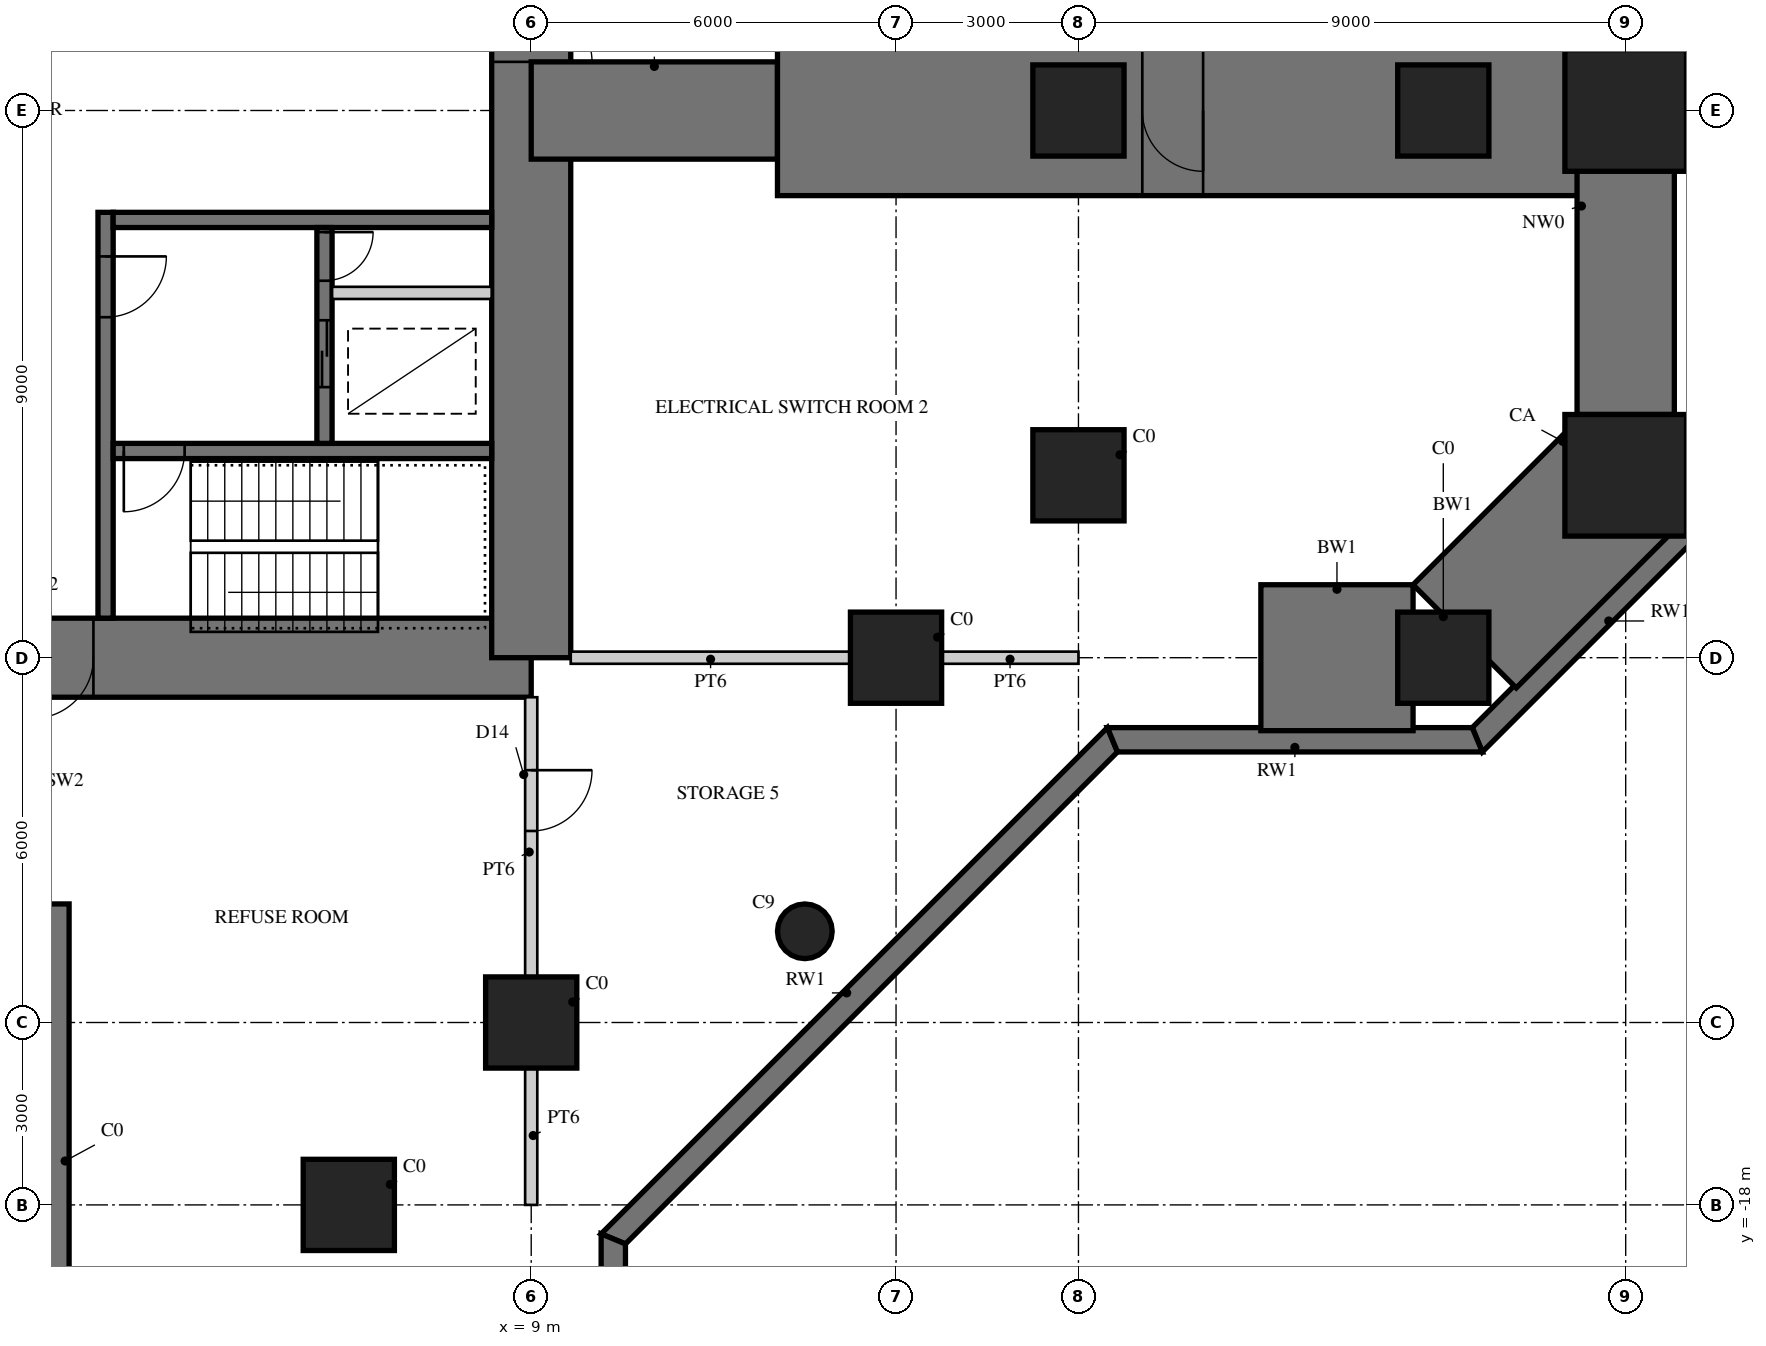
"""IFC4 building model, lengths in metres.
Left out: names, types, materials, properties, quantities, classifications, styles, units other than length and angle.
Written with IfcOpenShell. Run it as: python <this file> out.ifc"""

import sys

from ifc_helpers import new_model, si_unit, direction, frame, frame_2d, origin, origin_2d, place, context, subcontext, project, spatial, polyline, rectangle, circle, outline, extrude, element, fill, save


model = new_model("IFC4")
c1 = context("Model", 3, precision=1e-05, world=origin(), true_north=direction((0.0, 1.0)))
c2 = subcontext(c1, "Body", "Model", "MODEL_VIEW")
j1 = project(units=[si_unit("LENGTHUNIT", "METRE"), si_unit("PLANEANGLEUNIT", "RADIAN")], contexts=[c1])
p1 = place(None, origin())
s1 = spatial("IfcSite", under=j1, at=p1, CompositionType="ELEMENT")
p2 = place(p1, origin())
s2 = spatial("IfcBuilding", under=s1, at=p2, CompositionType="ELEMENT")
p3 = place(p2, frame((0.0, 0.0, -4.0)))
s3 = spatial("IfcBuildingStorey", under=s2, at=p3, CompositionType="ELEMENT", Elevation=-4.0)
p4 = place(p3, origin())
e1 = element("IfcWall", 1, at=p4, inside=s3, PredefinedType="SOLIDWALL", context=c2, shape_type="SweptSolid", body=[
    extrude(outline(polyline([(18.476, -10.15), (18.642, -10.55), (10.55, -18.642), (10.15, -18.476), (18.476, -10.15)])), origin(), (0.0, 0.0, 1.0), 4.0),
])
p5 = place(p3, origin())
e2 = element("IfcWall", 2, at=p5, inside=s3, PredefinedType="SOLIDWALL", context=c2, shape_type="SweptSolid", body=[
    extrude(outline(polyline([(10.15, -18.476), (10.55, -18.642), (10.55, -24.642), (10.15, -24.476), (10.15, -18.476)])), origin(), (0.0, 0.0, 1.0), 4.0),
])
p6 = place(p3, origin())
e3 = element("IfcWall", 3, at=p6, inside=s3, PredefinedType="SOLIDWALL", context=c2, shape_type="SweptSolid", body=[
    extrude(outline(polyline([(28.15, -6.476), (28.55, -6.642), (24.642, -10.55), (24.476, -10.15), (28.15, -6.476)])), origin(), (0.0, 0.0, 1.0), 4.0),
])
p7 = place(p3, origin())
e4 = element("IfcWall", 4, at=p7, inside=s3, PredefinedType="SOLIDWALL", context=c2, shape_type="SweptSolid", body=[
    extrude(outline(polyline([(24.476, -10.15), (24.642, -10.55), (18.642, -10.55), (18.476, -10.15), (24.476, -10.15)])), origin(), (0.0, 0.0, 1.0), 4.0),
])
p8 = place(p3, frame((-9.0, -9.0, 0.0), z_axis=(0.0, 0.0, 1.0), x_axis=(1.0, 0.0, 0.0)))
e5 = element("IfcWall", 5, at=p8, inside=s3, PredefinedType="SHEAR", context=c2, shape_type="SweptSolid", body=[
    extrude(rectangle(XDim=18.0, YDim=1.3, at=frame_2d((9.0, 0.0))), origin(), (0.0, 0.0, 1.0), 4.0),
])
p9 = place(p8, frame((9.8, 0.0, 0.0)))
e6 = element("IfcOpeningElement", 6, at=p9, cuts=e5, PredefinedType="OPENING", context=c2, shape_type="SweptSolid", body=[
    extrude(rectangle(XDim=1.0, YDim=2.4, at=frame_2d((0.5, 1.2))), frame((0.0, 0.66, 0.0), z_axis=(0.0, -1.0, 0.0), x_axis=(1.0, 0.0, 0.0)), (0.0, 0.0, 1.0), 1.32),
])
p10 = place(p3, frame((9.0, -9.0, 0.0), z_axis=(0.0, 0.0, 1.0), x_axis=(0.0, 1.0, 0.0)))
e7 = element("IfcWall", 7, at=p10, inside=s3, PredefinedType="SHEAR", context=c2, shape_type="SweptSolid", body=[
    extrude(rectangle(XDim=18.0, YDim=1.3, at=frame_2d((9.0, 0.0))), origin(), (0.0, 0.0, 1.0), 4.0),
])
p11 = place(p10, frame((9.8, 0.0, 0.0)))
e8 = element("IfcOpeningElement", 8, at=p11, cuts=e7, PredefinedType="OPENING", context=c2, shape_type="SweptSolid", body=[
    extrude(rectangle(XDim=1.0, YDim=2.4, at=frame_2d((0.5, 1.2))), frame((0.0, 0.66, 0.0), z_axis=(0.0, -1.0, 0.0), x_axis=(1.0, 0.0, 0.0)), (0.0, 0.0, 1.0), 1.32),
])
p12 = place(p3, frame((2.0, -1.675, 0.0), z_axis=(0.0, 0.0, 1.0), x_axis=(0.0, -1.0, 0.0)))
e9 = element("IfcWall", 9, at=p12, inside=s3, PredefinedType="SHEAR", context=c2, shape_type="SweptSolid", body=[
    extrude(rectangle(XDim=6.675, YDim=0.25, at=frame_2d((3.337, 0.0))), origin(), (0.0, 0.0, 1.0), 4.0),
])
p13 = place(p12, frame((0.725, 0.0, 0.0)))
e10 = element("IfcOpeningElement", 10, at=p13, cuts=e9, PredefinedType="OPENING", context=c2, shape_type="SweptSolid", body=[
    extrude(rectangle(XDim=1.0, YDim=2.1, at=frame_2d((0.5, 1.05))), frame((0.0, 0.135, 0.0), z_axis=(0.0, -1.0, 0.0), x_axis=(1.0, 0.0, 0.0)), (0.0, 0.0, 1.0), 0.27),
])
p14 = place(p3, frame((2.125, -1.8, 0.0), z_axis=(0.0, 0.0, 1.0), x_axis=(1.0, 0.0, 0.0)))
e11 = element("IfcWall", 11, at=p14, inside=s3, PredefinedType="SHEAR", context=c2, shape_type="SweptSolid", body=[
    extrude(rectangle(XDim=6.225, YDim=0.25, at=frame_2d((3.113, 0.0))), origin(), (0.0, 0.0, 1.0), 4.0),
])
p15 = place(p3, frame((2.125, -5.6, 0.0), z_axis=(0.0, 0.0, 1.0), x_axis=(1.0, 0.0, 0.0)))
e12 = element("IfcWall", 12, at=p15, inside=s3, PredefinedType="SHEAR", context=c2, shape_type="SweptSolid", body=[
    extrude(rectangle(XDim=6.225, YDim=0.25, at=frame_2d((3.113, 0.0))), origin(), (0.0, 0.0, 1.0), 4.0),
])
p16 = place(p15, frame((0.175, 0.0, 0.0)))
e13 = element("IfcOpeningElement", 13, at=p16, cuts=e12, PredefinedType="OPENING", context=c2, shape_type="SweptSolid", body=[
    extrude(rectangle(XDim=1.0, YDim=2.1, at=frame_2d((0.5, 1.05))), frame((0.0, 0.135, 0.0), z_axis=(0.0, -1.0, 0.0), x_axis=(1.0, 0.0, 0.0)), (0.0, 0.0, 1.0), 0.27),
])
p17 = place(p3, frame((5.6, -1.925, 0.0), z_axis=(0.0, 0.0, 1.0), x_axis=(0.0, -1.0, 0.0)))
e14 = element("IfcWall", 14, at=p17, inside=s3, PredefinedType="SHEAR", context=c2, shape_type="SweptSolid", body=[
    extrude(rectangle(XDim=3.55, YDim=0.25, at=frame_2d((1.775, 0.0))), origin(), (0.0, 0.0, 1.0), 4.0),
])
p18 = place(p17, frame((1.525, 0.0, 0.0)))
e15 = element("IfcOpeningElement", 15, at=p18, cuts=e14, PredefinedType="OPENING", context=c2, shape_type="SweptSolid", body=[
    extrude(rectangle(XDim=1.1, YDim=2.2, at=frame_2d((0.55, 1.1))), frame((0.0, 0.135, 0.0), z_axis=(0.0, -1.0, 0.0), x_axis=(1.0, 0.0, 0.0)), (0.0, 0.0, 1.0), 0.27),
])
p19 = place(p17, frame((0.075, 0.0, 0.0)))
e16 = element("IfcOpeningElement", 16, at=p19, cuts=e14, PredefinedType="OPENING", context=c2, shape_type="SweptSolid", body=[
    extrude(rectangle(XDim=0.8, YDim=2.1, at=frame_2d((0.4, 1.05))), frame((0.0, 0.135, 0.0), z_axis=(0.0, -1.0, 0.0), x_axis=(1.0, 0.0, 0.0)), (0.0, 0.0, 1.0), 0.27),
])
p20 = place(p3, frame((5.725, -3.0, 0.0), z_axis=(0.0, 0.0, 1.0), x_axis=(1.0, 0.0, 0.0)))
e17 = element("IfcWall", 17, at=p20, inside=s3, PredefinedType="PARTITIONING", context=c2, shape_type="SweptSolid", body=[
    extrude(rectangle(XDim=2.625, YDim=0.2, at=frame_2d((1.312, 0.0))), origin(), (0.0, 0.0, 1.0), 4.0),
])
p21 = place(p3, frame((9.0, 0.0, 0.0), z_axis=(0.0, 0.0, 1.0), x_axis=(1.0, 0.0, 0.0)))
e18 = element("IfcWall", 18, at=p21, inside=s3, PredefinedType="SHEAR", context=c2, shape_type="SweptSolid", body=[
    extrude(rectangle(XDim=4.05, YDim=1.6, at=frame_2d((2.025, 0.0))), origin(), (0.0, 0.0, 1.0), 4.0),
])
p22 = place(p3, frame((13.05, 0.0, 0.0), z_axis=(0.0, 0.0, 1.0), x_axis=(1.0, 0.0, 0.0)))
e19 = element("IfcWall", 19, at=p22, inside=s3, PredefinedType="SHEAR", context=c2, shape_type="SweptSolid", body=[
    extrude(rectangle(XDim=13.95, YDim=2.8, at=frame_2d((6.975, 0.0))), origin(), (0.0, 0.0, 1.0), 4.0),
])
p23 = place(p22, frame((6.0, 0.0, 0.0)))
e20 = element("IfcOpeningElement", 20, at=p23, cuts=e19, PredefinedType="OPENING", context=c2, shape_type="SweptSolid", body=[
    extrude(rectangle(XDim=1.0, YDim=2.2, at=frame_2d((0.5, 1.1))), frame((0.0, 1.41, 0.0), z_axis=(0.0, -1.0, 0.0), x_axis=(1.0, 0.0, 0.0)), (0.0, 0.0, 1.0), 2.82),
])
p24 = place(p3, frame((21.0, -9.0, 0.0), z_axis=(0.0, 0.0, 1.0), x_axis=(1.0, 0.0, 0.0)))
e21 = element("IfcWall", 21, at=p24, inside=s3, PredefinedType="SHEAR", context=c2, shape_type="SweptSolid", body=[
    extrude(rectangle(XDim=2.503, YDim=2.4, at=frame_2d((1.251, 0.0))), origin(), (0.0, 0.0, 1.0), 4.0),
])
p25 = place(p3, frame((24.352, -8.648, 0.0), z_axis=(0.0, 0.0, 1.0), x_axis=(0.707106781187, 0.707106781187, 0.0)))
e22 = element("IfcWall", 22, at=p25, inside=s3, PredefinedType="SHEAR", context=c2, shape_type="SweptSolid", body=[
    extrude(rectangle(XDim=3.745, YDim=2.4, at=frame_2d((1.873, 0.0))), origin(), (0.0, 0.0, 1.0), 4.0),
])
p26 = place(p3, frame((27.0, -5.0, 0.0), z_axis=(0.0, 0.0, 1.0), x_axis=(0.0, 1.0, 0.0)))
e23 = element("IfcWall", 23, at=p26, inside=s3, PredefinedType="SHEAR", context=c2, shape_type="SweptSolid", body=[
    extrude(rectangle(XDim=10.0, YDim=1.6, at=frame_2d((5.0, 0.0))), origin(), (0.0, 0.0, 1.0), 4.0),
])
p27 = place(p3, frame((0.0, -13.05, 0.0), z_axis=(0.0, 0.0, 1.0), x_axis=(0.0, -1.0, 0.0)))
e24 = element("IfcWall", 24, at=p27, inside=s3, PredefinedType="SHEAR", context=c2, shape_type="SweptSolid", body=[
    extrude(rectangle(XDim=13.95, YDim=2.8, at=frame_2d((6.975, 0.0))), origin(), (0.0, 0.0, 1.0), 4.0),
])
p28 = place(p27, frame((6.0, 0.0, 0.0)))
e25 = element("IfcOpeningElement", 25, at=p28, cuts=e24, PredefinedType="OPENING", context=c2, shape_type="SweptSolid", body=[
    extrude(rectangle(XDim=1.0, YDim=2.2, at=frame_2d((0.5, 1.1))), frame((0.0, 1.41, 0.0), z_axis=(0.0, -1.0, 0.0), x_axis=(1.0, 0.0, 0.0)), (0.0, 0.0, 1.0), 2.82),
])
for number, where, z_axis, x_axis in (
    (26, (15.0, -9.0, 0.0), (0.0, 0.0, 1.0), (1.0, 0.0, 0.0)),
    (27, (24.0, -9.0, 0.0), (0.0, 0.0, 1.0), (1.0, 0.0, 0.0)),
):
    element("IfcColumn", number, at=place(p3, frame(where, z_axis=z_axis, x_axis=x_axis)), inside=s3, PredefinedType="COLUMN", context=c2, shape_type="SweptSolid", body=[
        extrude(rectangle(XDim=1.5, YDim=1.5, at=origin_2d()), origin(), (0.0, 0.0, 1.0), 4.0),
    ])
for number, where, z_axis, x_axis in (
    (28, (27.0, -6.0, 0.0), (0.0, 0.0, 1.0), (1.0, 0.0, 0.0)),
    (29, (27.0, 0.0, 0.0), (0.0, 0.0, 1.0), (1.0, 0.0, 0.0)),
):
    element("IfcColumn", number, at=place(p3, frame(where, z_axis=z_axis, x_axis=x_axis)), inside=s3, PredefinedType="COLUMN", context=c2, shape_type="SweptSolid", body=[
        extrude(rectangle(XDim=2.0, YDim=2.0, at=origin_2d()), origin(), (0.0, 0.0, 1.0), 4.0),
    ])
for number, where, z_axis, x_axis in (
    (30, (9.0, -15.0, 0.0), (0.0, 0.0, 1.0), (1.0, 0.0, 0.0)),
    (31, (18.0, -6.0, 0.0), (0.0, 0.0, 1.0), (1.0, 0.0, 0.0)),
    (32, (18.0, 0.0, 0.0), (0.0, 0.0, 1.0), (1.0, 0.0, 0.0)),
    (33, (24.0, 0.0, 0.0), (0.0, 0.0, 1.0), (1.0, 0.0, 0.0)),
    (34, (6.0, -18.0, 0.0), (0.0, 0.0, 1.0), (1.0, 0.0, 0.0)),
):
    element("IfcColumn", number, at=place(p3, frame(where, z_axis=z_axis, x_axis=x_axis)), inside=s3, PredefinedType="COLUMN", context=c2, shape_type="SweptSolid", body=[
        extrude(rectangle(XDim=1.5, YDim=1.5, at=origin_2d()), origin(), (0.0, 0.0, 1.0), 4.0),
    ])
p29 = place(p3, frame((13.5, -13.5, 0.0), z_axis=(0.0, 0.0, 1.0), x_axis=(1.0, 0.0, 0.0)))
e35 = element("IfcColumn", 35, at=p29, inside=s3, PredefinedType="COLUMN", context=c2, shape_type="SweptSolid", body=[
    extrude(circle(Radius=0.45, at=origin_2d()), origin(), (0.0, 0.0, 1.0), 4.0),
])
p30 = place(p3, frame((9.0, -9.65, 0.0), z_axis=(0.0, 0.0, 1.0), x_axis=(0.0, -1.0, 0.0)))
e36 = element("IfcWall", 36, at=p30, inside=s3, PredefinedType="SOLIDWALL", context=c2, shape_type="SweptSolid", body=[
    extrude(rectangle(XDim=4.6, YDim=0.2, at=frame_2d((2.3, 0.0))), origin(), (0.0, 0.0, 1.0), 2.7),
])
p31 = place(p30, frame((1.2, 0.0, 0.0)))
e37 = element("IfcOpeningElement", 37, at=p31, cuts=e36, PredefinedType="OPENING", context=c2, shape_type="SweptSolid", body=[
    extrude(rectangle(XDim=1.0, YDim=2.2, at=frame_2d((0.5, 1.1))), frame((0.0, 0.11, 0.0), z_axis=(0.0, -1.0, 0.0), x_axis=(1.0, 0.0, 0.0)), (0.0, 0.0, 1.0), 0.22),
])
p32 = place(p3, frame((9.0, -15.75, 0.0), z_axis=(0.0, 0.0, 1.0), x_axis=(0.0, -1.0, 0.0)))
e38 = element("IfcWall", 38, at=p32, inside=s3, PredefinedType="SOLIDWALL", context=c2, shape_type="SweptSolid", body=[
    extrude(rectangle(XDim=2.25, YDim=0.2, at=frame_2d((1.125, 0.0))), origin(), (0.0, 0.0, 1.0), 2.7),
])
p33 = place(p3, frame((14.25, -9.0, 0.0), z_axis=(0.0, 0.0, 1.0), x_axis=(-1.0, 0.0, 0.0)))
e39 = element("IfcWall", 39, at=p33, inside=s3, PredefinedType="SOLIDWALL", context=c2, shape_type="SweptSolid", body=[
    extrude(rectangle(XDim=4.6, YDim=0.2, at=frame_2d((2.3, 0.0))), origin(), (0.0, 0.0, 1.0), 2.7),
])
p34 = place(p3, frame((18.0, -9.0, 0.0), z_axis=(0.0, 0.0, 1.0), x_axis=(-1.0, 0.0, 0.0)))
e40 = element("IfcWall", 40, at=p34, inside=s3, PredefinedType="SOLIDWALL", context=c2, shape_type="SweptSolid", body=[
    extrude(rectangle(XDim=2.25, YDim=0.2, at=frame_2d((1.125, 0.0))), origin(), (0.0, 0.0, 1.0), 2.7),
])
p35 = place(p31, origin())
e41 = element("IfcDoor", 41, at=p35, inside=s3, OperationType="SINGLE_SWING_LEFT", PredefinedType="DOOR", context=c2, shape_type="SweptSolid", body=[
    extrude(rectangle(XDim=1.0, YDim=2.2, at=frame_2d((0.5, 1.1))), frame((0.0, 0.025, 0.0), z_axis=(0.0, -1.0, 0.0), x_axis=(1.0, 0.0, 0.0)), (0.0, 0.0, 1.0), 0.05),
])
fill(e37, e41)
p36 = place(p23, frame((1.0, 0.0, 0.0), z_axis=(0.0, 0.0, 1.0), x_axis=(-1.0, 0.0, 0.0)))
e42 = element("IfcDoor", 42, at=p36, inside=s3, OperationType="SINGLE_SWING_LEFT", PredefinedType="DOOR", context=c2, shape_type="SweptSolid", body=[
    extrude(rectangle(XDim=1.0, YDim=2.2, at=frame_2d((0.5, 1.1))), frame((0.0, 0.025, 0.0), z_axis=(0.0, -1.0, 0.0), x_axis=(1.0, 0.0, 0.0)), (0.0, 0.0, 1.0), 0.05),
])
fill(e20, e42)
p37 = place(p9, frame((1.0, 0.0, 0.0), z_axis=(0.0, 0.0, 1.0), x_axis=(-1.0, 0.0, 0.0)))
e43 = element("IfcDoor", 43, at=p37, inside=s3, OperationType="SINGLE_SWING_RIGHT", PredefinedType="DOOR", context=c2, shape_type="SweptSolid", body=[
    extrude(rectangle(XDim=1.0, YDim=2.4, at=frame_2d((0.5, 1.2))), frame((0.0, -0.005, 0.0), z_axis=(0.0, -1.0, 0.0), x_axis=(1.0, 0.0, 0.0)), (0.0, 0.0, 1.0), 0.05),
])
fill(e6, e43)
p38 = place(p11, frame((1.0, 0.0, 0.0), z_axis=(0.0, 0.0, 1.0), x_axis=(-1.0, 0.0, 0.0)))
e44 = element("IfcDoor", 44, at=p38, inside=s3, OperationType="SINGLE_SWING_RIGHT", PredefinedType="DOOR", context=c2, shape_type="SweptSolid", body=[
    extrude(rectangle(XDim=1.0, YDim=2.4, at=frame_2d((0.5, 1.2))), frame((0.0, -0.005, 0.0), z_axis=(0.0, -1.0, 0.0), x_axis=(1.0, 0.0, 0.0)), (0.0, 0.0, 1.0), 0.05),
])
fill(e8, e44)
p39 = place(p13, origin())
e45 = element("IfcDoor", 45, at=p39, inside=s3, OperationType="SINGLE_SWING_LEFT", PredefinedType="DOOR", context=c2, shape_type="SweptSolid", body=[
    extrude(rectangle(XDim=1.0, YDim=2.1, at=frame_2d((0.5, 1.05))), frame((0.0, 0.025, 0.0), z_axis=(0.0, -1.0, 0.0), x_axis=(1.0, 0.0, 0.0)), (0.0, 0.0, 1.0), 0.05),
])
fill(e10, e45)
p40 = place(p16, frame((1.0, 0.0, 0.0), z_axis=(0.0, 0.0, 1.0), x_axis=(-1.0, 0.0, 0.0)))
e46 = element("IfcDoor", 46, at=p40, inside=s3, OperationType="SINGLE_SWING_RIGHT", PredefinedType="DOOR", context=c2, shape_type="SweptSolid", body=[
    extrude(rectangle(XDim=1.0, YDim=2.1, at=frame_2d((0.5, 1.05))), frame((0.0, 0.025, 0.0), z_axis=(0.0, -1.0, 0.0), x_axis=(1.0, 0.0, 0.0)), (0.0, 0.0, 1.0), 0.05),
])
fill(e13, e46)
p41 = place(p18, origin())
e47 = element("IfcDoor", 47, at=p41, inside=s3, OperationType="DOUBLE_DOOR_SLIDING", PredefinedType="DOOR", context=c2, shape_type="SweptSolid", body=[
    extrude(rectangle(XDim=1.1, YDim=2.2, at=frame_2d((0.55, 1.1))), frame((0.0, 0.025, 0.0), z_axis=(0.0, -1.0, 0.0), x_axis=(1.0, 0.0, 0.0)), (0.0, 0.0, 1.0), 0.05),
])
fill(e15, e47)
p42 = place(p19, origin())
e48 = element("IfcDoor", 48, at=p42, inside=s3, OperationType="SINGLE_SWING_LEFT", PredefinedType="DOOR", context=c2, shape_type="SweptSolid", body=[
    extrude(rectangle(XDim=0.8, YDim=2.1, at=frame_2d((0.4, 1.05))), frame((0.0, 0.025, 0.0), z_axis=(0.0, -1.0, 0.0), x_axis=(1.0, 0.0, 0.0)), (0.0, 0.0, 1.0), 0.05),
])
fill(e16, e48)
save(model, sys.argv[1])
